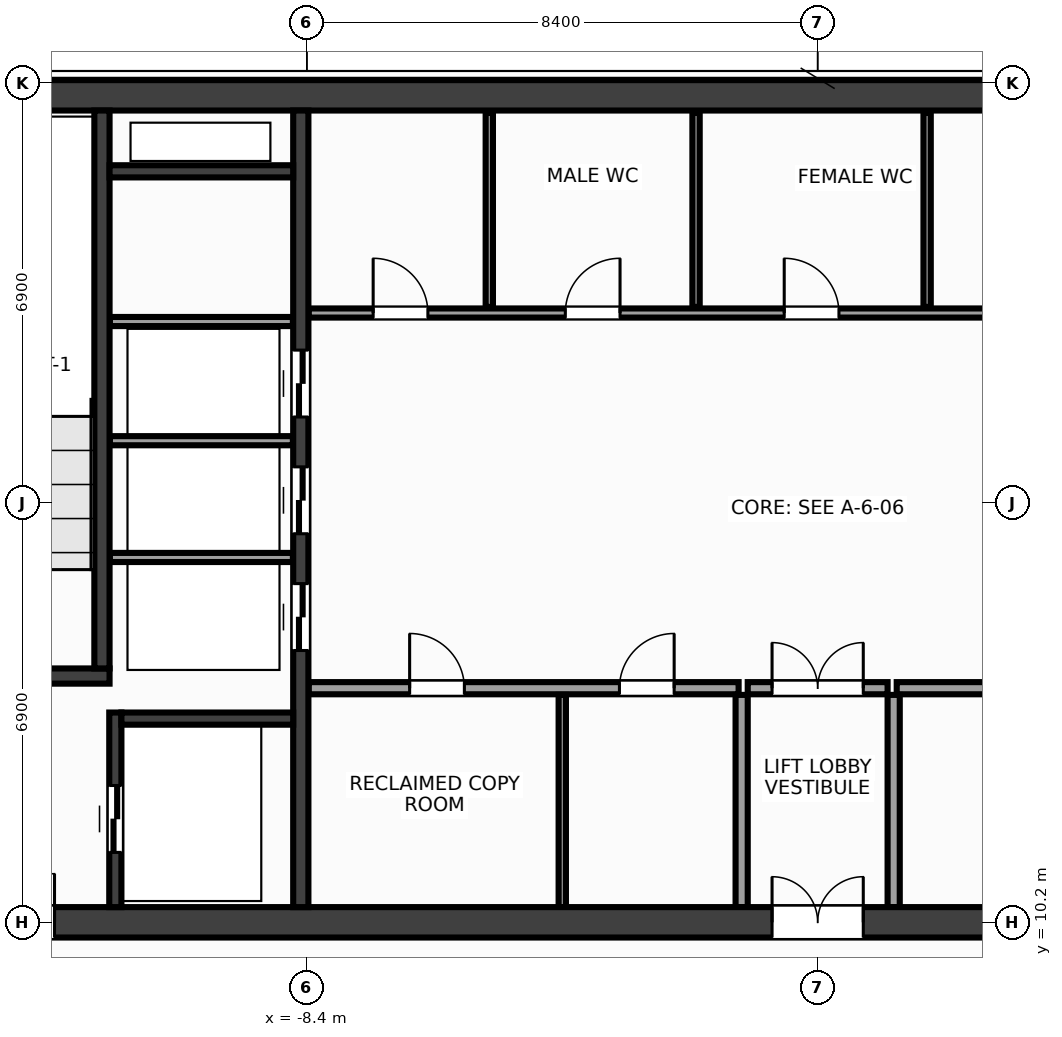
"""IFC4 building model, lengths in metres.
Left out: names, types, materials, properties, quantities, classifications, styles, units other than length and angle.
Written with IfcOpenShell. Run it as: python <this file> out.ifc"""

import sys

from ifc_helpers import new_model, si_unit, direction, frame, frame_2d, origin, place, context, subcontext, project, spatial, rectangle, extrude, source, transform, mapped, element, fill, save


model = new_model("IFC4")
c1 = context("Model", 3, precision=1e-05, world=origin(), true_north=direction((0.0, 1.0)))
c2 = subcontext(c1, "Body", "Model", "MODEL_VIEW")
j1 = project(units=[si_unit("LENGTHUNIT", "METRE"), si_unit("PLANEANGLEUNIT", "RADIAN")], contexts=[c1])
p1 = place(None, origin())
s1 = spatial("IfcSite", under=j1, at=p1, CompositionType="ELEMENT")
p2 = place(p1, origin())
s2 = spatial("IfcBuilding", under=s1, at=p2, CompositionType="ELEMENT")
p3 = place(p2, frame((0.0, 0.0, 232.4)))
s3 = spatial("IfcBuildingStorey", under=s2, at=p3, CompositionType="ELEMENT", Elevation=232.4)
m1 = source(origin(), c2, "Body", "SweptSolid", [
    extrude(rectangle(XDim=31.7, YDim=0.5, at=frame_2d((15.85, 0.0))), origin(), (0.0, 0.0, 1.0), 3.6),
])
p4 = place(p3, frame((-15.85, 23.8, 0.0), z_axis=(0.0, 0.0, 1.0), x_axis=(1.0, 0.0, 0.0)))
e1 = element("IfcWall", 1, at=p4, inside=s3, PredefinedType="SHEAR", context=c2, shape_type="MappedRepresentation", body=[
    mapped(m1, transform((0.0, 0.0, 0.0), x_axis=(1.0, 0.0, 0.0), y_axis=(0.0, 1.0, 0.0), z_axis=(0.0, 0.0, 1.0), scale=1.0)),
])
p5 = place(p3, frame((-15.85, 10.2, 0.0), z_axis=(0.0, 0.0, 1.0), x_axis=(1.0, 0.0, 0.0)))
e2 = element("IfcWall", 2, at=p5, inside=s3, PredefinedType="SHEAR", context=c2, shape_type="MappedRepresentation", body=[
    mapped(m1, transform((0.0, 0.0, 0.0), x_axis=(1.0, 0.0, 0.0), y_axis=(0.0, 1.0, 0.0), z_axis=(0.0, 0.0, 1.0), scale=1.0)),
])
p6 = place(p5, frame((1.7, 0.0, 0.0)))
e3 = element("IfcOpeningElement", 3, at=p6, cuts=e2, PredefinedType="OPENING", context=c2, shape_type="SweptSolid", body=[
    extrude(rectangle(XDim=1.6, YDim=2.15, at=frame_2d((0.8, 1.075))), frame((0.0, 0.262, 0.0), z_axis=(0.0, -1.0, 0.0), x_axis=(1.0, 0.0, 0.0)), (0.0, 0.0, 1.0), 0.524),
])
p7 = place(p5, frame((28.4, 0.0, 0.0)))
e4 = element("IfcOpeningElement", 4, at=p7, cuts=e2, PredefinedType="OPENING", context=c2, shape_type="SweptSolid", body=[
    extrude(rectangle(XDim=1.6, YDim=2.15, at=frame_2d((0.8, 1.075))), frame((0.0, 0.262, 0.0), z_axis=(0.0, -1.0, 0.0), x_axis=(1.0, 0.0, 0.0)), (0.0, 0.0, 1.0), 0.524),
])
p8 = place(p5, frame((15.1, 0.0, 0.0)))
e5 = element("IfcOpeningElement", 5, at=p8, cuts=e2, PredefinedType="OPENING", context=c2, shape_type="SweptSolid", body=[
    extrude(rectangle(XDim=1.5, YDim=2.2, at=frame_2d((0.75, 1.1))), frame((0.0, 0.262, 0.0), z_axis=(0.0, -1.0, 0.0), x_axis=(1.0, 0.0, 0.0)), (0.0, 0.0, 1.0), 0.524),
])
m2 = source(origin(), c2, "Body", "SweptSolid", [
    extrude(rectangle(XDim=13.1, YDim=0.25, at=frame_2d((6.55, 0.0))), origin(), (0.0, 0.0, 1.0), 3.6),
])
p9 = place(p3, frame((-8.5, 10.45, 0.0), z_axis=(0.0, 0.0, 1.0), x_axis=(0.0, 1.0, 0.0)))
e6 = element("IfcWall", 6, at=p9, inside=s3, PredefinedType="SHEAR", context=c2, shape_type="MappedRepresentation", body=[
    mapped(m2, transform((0.0, 0.0, 0.0), x_axis=(1.0, 0.0, 0.0), y_axis=(0.0, 1.0, 0.0), z_axis=(0.0, 0.0, 1.0), scale=1.0)),
])
p10 = place(p9, frame((4.22, 0.0, 0.0)))
e7 = element("IfcOpeningElement", 7, at=p10, cuts=e6, PredefinedType="OPENING", context=c2, shape_type="SweptSolid", body=[
    extrude(rectangle(XDim=1.1, YDim=2.15, at=frame_2d((0.55, 1.075))), frame((0.0, 0.137, 0.0), z_axis=(0.0, -1.0, 0.0), x_axis=(1.0, 0.0, 0.0)), (0.0, 0.0, 1.0), 0.274),
])
p11 = place(p9, frame((6.14, 0.0, 0.0)))
e8 = element("IfcOpeningElement", 8, at=p11, cuts=e6, PredefinedType="OPENING", context=c2, shape_type="SweptSolid", body=[
    extrude(rectangle(XDim=1.1, YDim=2.15, at=frame_2d((0.55, 1.075))), frame((0.0, 0.137, 0.0), z_axis=(0.0, -1.0, 0.0), x_axis=(1.0, 0.0, 0.0)), (0.0, 0.0, 1.0), 0.274),
])
p12 = place(p9, frame((8.06, 0.0, 0.0)))
e9 = element("IfcOpeningElement", 9, at=p12, cuts=e6, PredefinedType="OPENING", context=c2, shape_type="SweptSolid", body=[
    extrude(rectangle(XDim=1.1, YDim=2.15, at=frame_2d((0.55, 1.075))), frame((0.0, 0.137, 0.0), z_axis=(0.0, -1.0, 0.0), x_axis=(1.0, 0.0, 0.0)), (0.0, 0.0, 1.0), 0.274),
])
m3 = source(origin(), c2, "Body", "SweptSolid", [
    extrude(rectangle(XDim=3.705, YDim=0.25, at=frame_2d((1.853, 0.0))), origin(), (0.0, 0.0, 1.0), 3.6),
])
p13 = place(p3, frame((-15.35, 14.25, 0.0), z_axis=(0.0, 0.0, 1.0), x_axis=(1.0, 0.0, 0.0)))
e10 = element("IfcWall", 10, at=p13, inside=s3, PredefinedType="SHEAR", context=c2, shape_type="MappedRepresentation", body=[
    mapped(m3, transform((0.0, 0.0, 0.0), x_axis=(1.0, 0.0, 0.0), y_axis=(0.0, 1.0, 0.0), z_axis=(0.0, 0.0, 1.0), scale=1.0)),
])
p14 = place(p13, frame((0.95, 0.0, 0.0)))
e11 = element("IfcOpeningElement", 11, at=p14, cuts=e10, PredefinedType="OPENING", context=c2, shape_type="SweptSolid", body=[
    extrude(rectangle(XDim=1.6, YDim=2.15, at=frame_2d((0.8, 1.075))), frame((0.0, 0.137, 0.0), z_axis=(0.0, -1.0, 0.0), x_axis=(1.0, 0.0, 0.0)), (0.0, 0.0, 1.0), 0.274),
])
m4 = source(origin(), c2, "Body", "SweptSolid", [
    extrude(rectangle(XDim=9.175, YDim=0.25, at=frame_2d((4.587, 0.0))), origin(), (0.0, 0.0, 1.0), 3.6),
])
p15 = place(p3, frame((-11.77, 14.375, 0.0), z_axis=(0.0, 0.0, 1.0), x_axis=(0.0, 1.0, 0.0)))
e12 = element("IfcWall", 12, at=p15, inside=s3, PredefinedType="SHEAR", context=c2, shape_type="MappedRepresentation", body=[
    mapped(m4, transform((0.0, 0.0, 0.0), x_axis=(1.0, 0.0, 0.0), y_axis=(0.0, 1.0, 0.0), z_axis=(0.0, 0.0, 1.0), scale=1.0)),
])
m5 = source(origin(), c2, "Body", "SweptSolid", [
    extrude(rectangle(XDim=3.2, YDim=0.2, at=frame_2d((1.6, 0.0))), origin(), (0.0, 0.0, 1.0), 3.6),
])
p16 = place(p3, frame((-11.55, 10.45, 0.0), z_axis=(0.0, 0.0, 1.0), x_axis=(0.0, 1.0, 0.0)))
e13 = element("IfcWall", 13, at=p16, inside=s3, PredefinedType="SHEAR", context=c2, shape_type="MappedRepresentation", body=[
    mapped(m5, transform((0.0, 0.0, 0.0), x_axis=(1.0, 0.0, 0.0), y_axis=(0.0, 1.0, 0.0), z_axis=(0.0, 0.0, 1.0), scale=1.0)),
])
p17 = place(p16, frame((0.9, 0.0, 0.0)))
e14 = element("IfcOpeningElement", 14, at=p17, cuts=e13, PredefinedType="OPENING", context=c2, shape_type="SweptSolid", body=[
    extrude(rectangle(XDim=1.1, YDim=2.15, at=frame_2d((0.55, 1.075))), frame((0.0, 0.112, 0.0), z_axis=(0.0, -1.0, 0.0), x_axis=(1.0, 0.0, 0.0)), (0.0, 0.0, 1.0), 0.224),
])
m6 = source(origin(), c2, "Body", "SweptSolid", [
    extrude(rectangle(XDim=2.825, YDim=0.2, at=frame_2d((1.413, 0.0))), origin(), (0.0, 0.0, 1.0), 3.6),
])
p18 = place(p3, frame((-11.45, 13.55, 0.0), z_axis=(0.0, 0.0, 1.0), x_axis=(1.0, 0.0, 0.0)))
e15 = element("IfcWall", 15, at=p18, inside=s3, PredefinedType="SHEAR", context=c2, shape_type="MappedRepresentation", body=[
    mapped(m6, transform((0.0, 0.0, 0.0), x_axis=(1.0, 0.0, 0.0), y_axis=(0.0, 1.0, 0.0), z_axis=(0.0, 0.0, 1.0), scale=1.0)),
])
m7 = source(origin(), c2, "Body", "SweptSolid", [
    extrude(rectangle(XDim=3.02, YDim=0.2, at=frame_2d((1.51, 0.0))), origin(), (0.0, 0.0, 1.0), 3.6),
])
p19 = place(p3, frame((-11.645, 22.55, 0.0), z_axis=(0.0, 0.0, 1.0), x_axis=(1.0, 0.0, 0.0)))
e16 = element("IfcWall", 16, at=p19, inside=s3, PredefinedType="SHEAR", context=c2, shape_type="MappedRepresentation", body=[
    mapped(m7, transform((0.0, 0.0, 0.0), x_axis=(1.0, 0.0, 0.0), y_axis=(0.0, 1.0, 0.0), z_axis=(0.0, 0.0, 1.0), scale=1.0)),
])
m8 = source(origin(), c2, "Body", "SweptSolid", [
    extrude(rectangle(XDim=3.01, YDim=0.15, at=frame_2d((1.505, 0.0))), origin(), (0.0, 0.0, 1.0), 3.37),
])
for number, where, z_axis, x_axis in (
    (17, (-11.64, 16.2, 0.0), (0.0, 0.0, 1.0), (1.0, 0.0, 0.0)),
    (18, (-11.64, 18.12, 0.0), (0.0, 0.0, 1.0), (1.0, 0.0, 0.0)),
    (19, (-11.64, 20.08, 0.0), (0.0, 0.0, 1.0), (1.0, 0.0, 0.0)),
):
    element("IfcWall", number, at=place(p3, frame(where, z_axis=z_axis, x_axis=x_axis)), inside=s3, PredefinedType="PARTITIONING", context=c2, shape_type="MappedRepresentation", body=[
        mapped(m8, transform((0.0, 0.0, 0.0), x_axis=(1.0, 0.0, 0.0), y_axis=(0.0, 1.0, 0.0), z_axis=(0.0, 0.0, 1.0), scale=1.0)),
    ])
m9 = source(origin(), c2, "Body", "SweptSolid", [
    extrude(rectangle(XDim=7.07, YDim=0.2, at=frame_2d((3.535, 0.0))), origin(), (0.0, 0.0, 1.0), 3.37),
])
p20 = place(p3, frame((-8.37, 14.05, 0.0), z_axis=(0.0, 0.0, 1.0), x_axis=(1.0, 0.0, 0.0)))
e20 = element("IfcWall", 20, at=p20, inside=s3, PredefinedType="PARTITIONING", context=c2, shape_type="MappedRepresentation", body=[
    mapped(m9, transform((0.0, 0.0, 0.0), x_axis=(1.0, 0.0, 0.0), y_axis=(0.0, 1.0, 0.0), z_axis=(0.0, 0.0, 1.0), scale=1.0)),
])
p21 = place(p20, frame((1.66, 0.0, 0.0)))
e21 = element("IfcOpeningElement", 21, at=p21, cuts=e20, PredefinedType="OPENING", context=c2, shape_type="SweptSolid", body=[
    extrude(rectangle(XDim=0.9, YDim=2.15, at=frame_2d((0.45, 1.075))), frame((0.0, 0.112, 0.0), z_axis=(0.0, -1.0, 0.0), x_axis=(1.0, 0.0, 0.0)), (0.0, 0.0, 1.0), 0.224),
])
p22 = place(p20, frame((5.11, 0.0, 0.0)))
e22 = element("IfcOpeningElement", 22, at=p22, cuts=e20, PredefinedType="OPENING", context=c2, shape_type="SweptSolid", body=[
    extrude(rectangle(XDim=0.9, YDim=2.15, at=frame_2d((0.45, 1.075))), frame((0.0, 0.112, 0.0), z_axis=(0.0, -1.0, 0.0), x_axis=(1.0, 0.0, 0.0)), (0.0, 0.0, 1.0), 0.224),
])
p23 = place(p3, frame((1.3, 14.05, 0.0), z_axis=(0.0, 0.0, 1.0), x_axis=(1.0, 0.0, 0.0)))
e23 = element("IfcWall", 23, at=p23, inside=s3, PredefinedType="PARTITIONING", context=c2, shape_type="MappedRepresentation", body=[
    mapped(m9, transform((0.0, 0.0, 0.0), x_axis=(1.0, 0.0, 0.0), y_axis=(0.0, 1.0, 0.0), z_axis=(0.0, 0.0, 1.0), scale=1.0)),
])
p24 = place(p23, frame((2.8, 0.0, 0.0)))
e24 = element("IfcOpeningElement", 24, at=p24, cuts=e23, PredefinedType="OPENING", context=c2, shape_type="SweptSolid", body=[
    extrude(rectangle(XDim=0.98, YDim=2.15, at=frame_2d((0.49, 1.075))), frame((0.0, 0.112, 0.0), z_axis=(0.0, -1.0, 0.0), x_axis=(1.0, 0.0, 0.0)), (0.0, 0.0, 1.0), 0.224),
])
m10 = source(origin(), c2, "Body", "SweptSolid", [
    extrude(rectangle(XDim=3.49, YDim=0.2, at=frame_2d((1.745, 0.0))), origin(), (0.0, 0.0, 1.0), 3.37),
])
for number, where, z_axis, x_axis in (
    (25, (-1.25, 10.45, 0.0), (0.0, 0.0, 1.0), (0.0, 1.0, 0.0)),
    (26, (1.25, 10.45, 0.0), (0.0, 0.0, 1.0), (0.0, 1.0, 0.0)),
):
    element("IfcWall", number, at=place(p3, frame(where, z_axis=z_axis, x_axis=x_axis)), inside=s3, PredefinedType="PARTITIONING", context=c2, shape_type="MappedRepresentation", body=[
        mapped(m10, transform((0.0, 0.0, 0.0), x_axis=(1.0, 0.0, 0.0), y_axis=(0.0, 1.0, 0.0), z_axis=(0.0, 0.0, 1.0), scale=1.0)),
    ])
m11 = source(origin(), c2, "Body", "SweptSolid", [
    extrude(rectangle(XDim=2.3, YDim=0.2, at=frame_2d((1.15, 0.0))), origin(), (0.0, 0.0, 1.0), 3.37),
])
p25 = place(p3, frame((-1.15, 14.05, 0.0), z_axis=(0.0, 0.0, 1.0), x_axis=(1.0, 0.0, 0.0)))
e27 = element("IfcWall", 27, at=p25, inside=s3, PredefinedType="PARTITIONING", context=c2, shape_type="MappedRepresentation", body=[
    mapped(m11, transform((0.0, 0.0, 0.0), x_axis=(1.0, 0.0, 0.0), y_axis=(0.0, 1.0, 0.0), z_axis=(0.0, 0.0, 1.0), scale=1.0)),
])
p26 = place(p25, frame((0.4, 0.0, 0.0)))
e28 = element("IfcOpeningElement", 28, at=p26, cuts=e27, PredefinedType="OPENING", context=c2, shape_type="SweptSolid", body=[
    extrude(rectangle(XDim=1.5, YDim=2.2, at=frame_2d((0.75, 1.1))), frame((0.0, 0.112, 0.0), z_axis=(0.0, -1.0, 0.0), x_axis=(1.0, 0.0, 0.0)), (0.0, 0.0, 1.0), 0.224),
])
m12 = source(origin(), c2, "Body", "SweptSolid", [
    extrude(rectangle(XDim=14.59, YDim=0.15, at=frame_2d((7.295, 0.0))), origin(), (0.0, 0.0, 1.0), 3.37),
])
p27 = place(p3, frame((-8.37, 20.22, 0.0), z_axis=(0.0, 0.0, 1.0), x_axis=(1.0, 0.0, 0.0)))
e29 = element("IfcWall", 29, at=p27, inside=s3, PredefinedType="PARTITIONING", context=c2, shape_type="MappedRepresentation", body=[
    mapped(m12, transform((0.0, 0.0, 0.0), x_axis=(1.0, 0.0, 0.0), y_axis=(0.0, 1.0, 0.0), z_axis=(0.0, 0.0, 1.0), scale=1.0)),
])
p28 = place(p27, frame((1.06, 0.0, 0.0)))
e30 = element("IfcOpeningElement", 30, at=p28, cuts=e29, PredefinedType="OPENING", context=c2, shape_type="SweptSolid", body=[
    extrude(rectangle(XDim=0.9, YDim=2.15, at=frame_2d((0.45, 1.075))), frame((0.0, 0.087, 0.0), z_axis=(0.0, -1.0, 0.0), x_axis=(1.0, 0.0, 0.0)), (0.0, 0.0, 1.0), 0.174),
])
p29 = place(p27, frame((4.22, 0.0, 0.0)))
e31 = element("IfcOpeningElement", 31, at=p29, cuts=e29, PredefinedType="OPENING", context=c2, shape_type="SweptSolid", body=[
    extrude(rectangle(XDim=0.9, YDim=2.15, at=frame_2d((0.45, 1.075))), frame((0.0, 0.087, 0.0), z_axis=(0.0, -1.0, 0.0), x_axis=(1.0, 0.0, 0.0)), (0.0, 0.0, 1.0), 0.174),
])
p30 = place(p27, frame((7.82, 0.0, 0.0)))
e32 = element("IfcOpeningElement", 32, at=p30, cuts=e29, PredefinedType="OPENING", context=c2, shape_type="SweptSolid", body=[
    extrude(rectangle(XDim=0.9, YDim=2.15, at=frame_2d((0.45, 1.075))), frame((0.0, 0.087, 0.0), z_axis=(0.0, -1.0, 0.0), x_axis=(1.0, 0.0, 0.0)), (0.0, 0.0, 1.0), 0.174),
])
p31 = place(p27, frame((11.87, 0.0, 0.0)))
e33 = element("IfcOpeningElement", 33, at=p31, cuts=e29, PredefinedType="OPENING", context=c2, shape_type="SweptSolid", body=[
    extrude(rectangle(XDim=0.9, YDim=2.15, at=frame_2d((0.45, 1.075))), frame((0.0, 0.087, 0.0), z_axis=(0.0, -1.0, 0.0), x_axis=(1.0, 0.0, 0.0)), (0.0, 0.0, 1.0), 0.174),
])
m13 = source(origin(), c2, "Body", "SweptSolid", [
    extrude(rectangle(XDim=3.49, YDim=0.12, at=frame_2d((1.745, 0.0))), origin(), (0.0, 0.0, 1.0), 3.37),
])
p32 = place(p3, frame((-4.2, 10.45, 0.0), z_axis=(0.0, 0.0, 1.0), x_axis=(0.0, 1.0, 0.0)))
e34 = element("IfcWall", 34, at=p32, inside=s3, PredefinedType="PARTITIONING", context=c2, shape_type="MappedRepresentation", body=[
    mapped(m13, transform((0.0, 0.0, 0.0), x_axis=(1.0, 0.0, 0.0), y_axis=(0.0, 1.0, 0.0), z_axis=(0.0, 0.0, 1.0), scale=1.0)),
])
m14 = source(origin(), c2, "Body", "SweptSolid", [
    extrude(rectangle(XDim=3.19, YDim=0.12, at=frame_2d((1.595, 0.0))), origin(), (0.0, 0.0, 1.0), 3.37),
])
for number, where, z_axis, x_axis in (
    (35, (-5.4, 20.32, 0.0), (0.0, 0.0, 1.0), (0.0, 1.0, 0.0)),
    (36, (-2.0, 20.32, 0.0), (0.0, 0.0, 1.0), (0.0, 1.0, 0.0)),
    (37, (1.8, 20.32, 0.0), (0.0, 0.0, 1.0), (0.0, 1.0, 0.0)),
):
    element("IfcWall", number, at=place(p3, frame(where, z_axis=z_axis, x_axis=x_axis)), inside=s3, PredefinedType="PARTITIONING", context=c2, shape_type="MappedRepresentation", body=[
        mapped(m14, transform((0.0, 0.0, 0.0), x_axis=(1.0, 0.0, 0.0), y_axis=(0.0, 1.0, 0.0), z_axis=(0.0, 0.0, 1.0), scale=1.0)),
    ])
m15 = source(origin(), c2, "Body", "SweptSolid", [
    extrude(rectangle(XDim=1.6, YDim=2.15, at=frame_2d((0.8, 1.075))), frame((0.0, 0.025, 0.0), z_axis=(0.0, -1.0, 0.0), x_axis=(1.0, 0.0, 0.0)), (0.0, 0.0, 1.0), 0.05),
])
p33 = place(p6, origin())
e38 = element("IfcDoor", 38, at=p33, inside=s3, OperationType="DOUBLE_DOOR_SINGLE_SWING", PredefinedType="DOOR", context=c2, shape_type="MappedRepresentation", body=[
    mapped(m15, transform((0.0, 0.0, 0.0), x_axis=(1.0, 0.0, 0.0), y_axis=(0.0, 1.0, 0.0), z_axis=(0.0, 0.0, 1.0), scale=1.0)),
])
fill(e3, e38)
m16 = source(origin(), c2, "Body", "SweptSolid", [
    extrude(rectangle(XDim=1.1, YDim=2.15, at=frame_2d((0.55, 1.075))), frame((0.0, 0.025, 0.0), z_axis=(0.0, -1.0, 0.0), x_axis=(1.0, 0.0, 0.0)), (0.0, 0.0, 1.0), 0.05),
])
p34 = place(p17, origin())
e39 = element("IfcDoor", 39, at=p34, inside=s3, OperationType="DOUBLE_DOOR_SLIDING", PredefinedType="DOOR", context=c2, shape_type="MappedRepresentation", body=[
    mapped(m16, transform((0.0, 0.0, 0.0), x_axis=(1.0, 0.0, 0.0), y_axis=(0.0, 1.0, 0.0), z_axis=(0.0, 0.0, 1.0), scale=1.0)),
])
fill(e14, e39)
p35 = place(p10, origin())
e40 = element("IfcDoor", 40, at=p35, inside=s3, OperationType="DOUBLE_DOOR_SLIDING", PredefinedType="DOOR", context=c2, shape_type="MappedRepresentation", body=[
    mapped(m16, transform((0.0, 0.0, 0.0), x_axis=(1.0, 0.0, 0.0), y_axis=(0.0, 1.0, 0.0), z_axis=(0.0, 0.0, 1.0), scale=1.0)),
])
fill(e7, e40)
p36 = place(p11, origin())
e41 = element("IfcDoor", 41, at=p36, inside=s3, OperationType="DOUBLE_DOOR_SLIDING", PredefinedType="DOOR", context=c2, shape_type="MappedRepresentation", body=[
    mapped(m16, transform((0.0, 0.0, 0.0), x_axis=(1.0, 0.0, 0.0), y_axis=(0.0, 1.0, 0.0), z_axis=(0.0, 0.0, 1.0), scale=1.0)),
])
fill(e8, e41)
p37 = place(p12, origin())
e42 = element("IfcDoor", 42, at=p37, inside=s3, OperationType="DOUBLE_DOOR_SLIDING", PredefinedType="DOOR", context=c2, shape_type="MappedRepresentation", body=[
    mapped(m16, transform((0.0, 0.0, 0.0), x_axis=(1.0, 0.0, 0.0), y_axis=(0.0, 1.0, 0.0), z_axis=(0.0, 0.0, 1.0), scale=1.0)),
])
fill(e9, e42)
m17 = source(origin(), c2, "Body", "SweptSolid", [
    extrude(rectangle(XDim=0.9, YDim=2.15, at=frame_2d((0.45, 1.075))), frame((0.0, 0.025, 0.0), z_axis=(0.0, -1.0, 0.0), x_axis=(1.0, 0.0, 0.0)), (0.0, 0.0, 1.0), 0.05),
])
p38 = place(p21, origin())
e43 = element("IfcDoor", 43, at=p38, inside=s3, OperationType="SINGLE_SWING_LEFT", PredefinedType="DOOR", context=c2, shape_type="MappedRepresentation", body=[
    mapped(m17, transform((0.0, 0.0, 0.0), x_axis=(1.0, 0.0, 0.0), y_axis=(0.0, 1.0, 0.0), z_axis=(0.0, 0.0, 1.0), scale=1.0)),
])
fill(e21, e43)
p39 = place(p22, origin())
e44 = element("IfcDoor", 44, at=p39, inside=s3, OperationType="SINGLE_SWING_RIGHT", PredefinedType="DOOR", context=c2, shape_type="MappedRepresentation", body=[
    mapped(m17, transform((0.0, 0.0, 0.0), x_axis=(1.0, 0.0, 0.0), y_axis=(0.0, 1.0, 0.0), z_axis=(0.0, 0.0, 1.0), scale=1.0)),
])
fill(e22, e44)
m18 = source(origin(), c2, "Body", "SweptSolid", [
    extrude(rectangle(XDim=1.5, YDim=2.2, at=frame_2d((0.75, 1.1))), frame((0.0, 0.025, 0.0), z_axis=(0.0, -1.0, 0.0), x_axis=(1.0, 0.0, 0.0)), (0.0, 0.0, 1.0), 0.05),
])
p40 = place(p26, origin())
e45 = element("IfcDoor", 45, at=p40, inside=s3, OperationType="DOUBLE_DOOR_SINGLE_SWING", PredefinedType="DOOR", context=c2, shape_type="MappedRepresentation", body=[
    mapped(m18, transform((0.0, 0.0, 0.0), x_axis=(1.0, 0.0, 0.0), y_axis=(0.0, 1.0, 0.0), z_axis=(0.0, 0.0, 1.0), scale=1.0)),
])
fill(e28, e45)
p41 = place(p8, origin())
e46 = element("IfcDoor", 46, at=p41, inside=s3, OperationType="DOUBLE_DOOR_SINGLE_SWING", PredefinedType="DOOR", context=c2, shape_type="MappedRepresentation", body=[
    mapped(m18, transform((0.0, 0.0, 0.0), x_axis=(1.0, 0.0, 0.0), y_axis=(0.0, 1.0, 0.0), z_axis=(0.0, 0.0, 1.0), scale=1.0)),
])
fill(e5, e46)
p42 = place(p28, origin())
e47 = element("IfcDoor", 47, at=p42, inside=s3, OperationType="SINGLE_SWING_LEFT", PredefinedType="DOOR", context=c2, shape_type="MappedRepresentation", body=[
    mapped(m17, transform((0.0, 0.0, 0.0), x_axis=(1.0, 0.0, 0.0), y_axis=(0.0, 1.0, 0.0), z_axis=(0.0, 0.0, 1.0), scale=1.0)),
])
fill(e30, e47)
p43 = place(p29, origin())
e48 = element("IfcDoor", 48, at=p43, inside=s3, OperationType="SINGLE_SWING_RIGHT", PredefinedType="DOOR", context=c2, shape_type="MappedRepresentation", body=[
    mapped(m17, transform((0.0, 0.0, 0.0), x_axis=(1.0, 0.0, 0.0), y_axis=(0.0, 1.0, 0.0), z_axis=(0.0, 0.0, 1.0), scale=1.0)),
])
fill(e31, e48)
p44 = place(p30, origin())
e49 = element("IfcDoor", 49, at=p44, inside=s3, OperationType="SINGLE_SWING_LEFT", PredefinedType="DOOR", context=c2, shape_type="MappedRepresentation", body=[
    mapped(m17, transform((0.0, 0.0, 0.0), x_axis=(1.0, 0.0, 0.0), y_axis=(0.0, 1.0, 0.0), z_axis=(0.0, 0.0, 1.0), scale=1.0)),
])
fill(e32, e49)
save(model, sys.argv[1])
